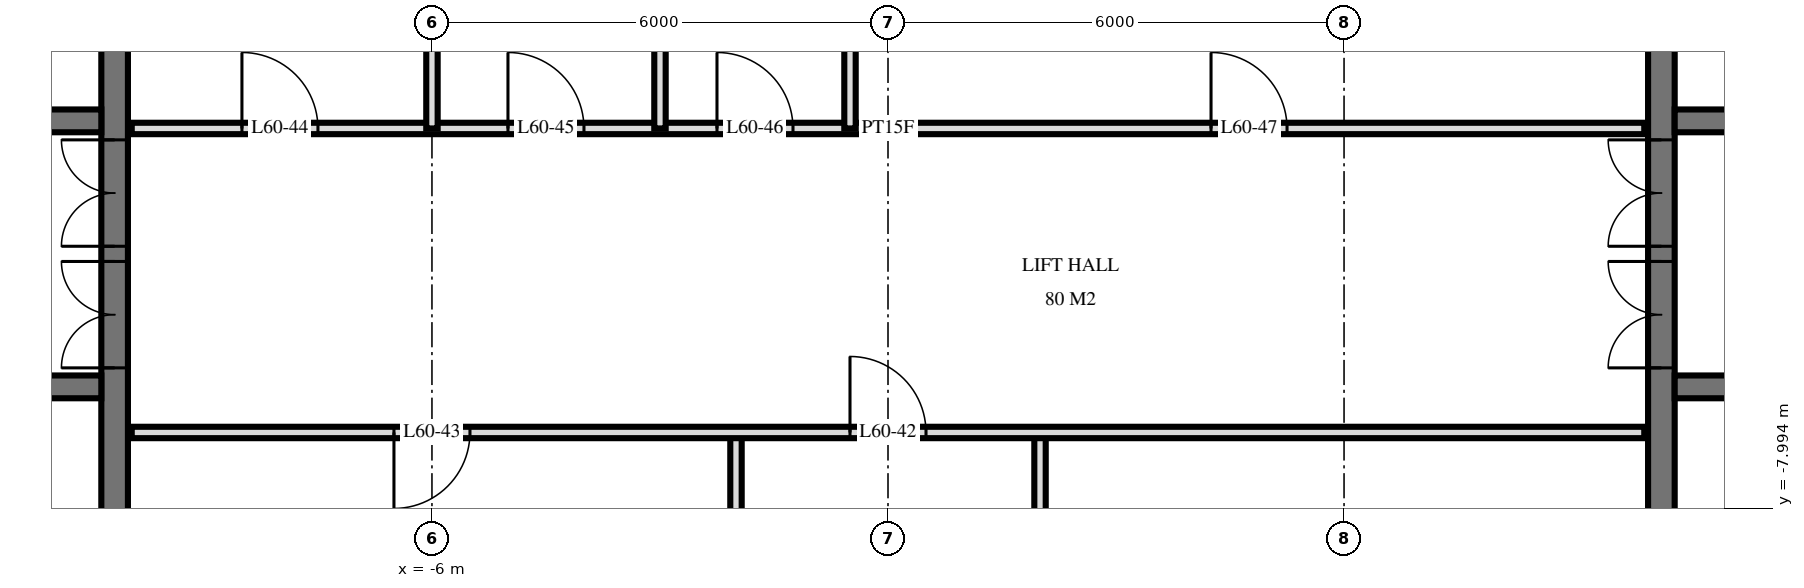
"""IFC4 building model, lengths in metres.
Left out: names, types, materials, properties, quantities, classifications, styles, units other than length and angle.
Written with IfcOpenShell. Run it as: python <this file> out.ifc"""

import sys

from ifc_helpers import new_model, si_unit, direction, frame, frame_2d, origin, place, context, subcontext, project, spatial, rectangle, extrude, element, fill, save


model = new_model("IFC4")
c1 = context("Model", 3, precision=1e-05, world=origin(), true_north=direction((0.0, 1.0)))
c2 = subcontext(c1, "Body", "Model", "MODEL_VIEW")
j1 = project(units=[si_unit("LENGTHUNIT", "METRE"), si_unit("PLANEANGLEUNIT", "RADIAN")], contexts=[c1])
p1 = place(None, origin())
s1 = spatial("IfcSite", under=j1, at=p1, CompositionType="ELEMENT")
p2 = place(p1, origin())
s2 = spatial("IfcBuilding", under=s1, at=p2, CompositionType="ELEMENT")
p3 = place(p2, frame((0.0, 0.0, 229.1)))
s3 = spatial("IfcBuildingStorey", under=s2, at=p3, CompositionType="ELEMENT", Elevation=229.1)
p4 = place(p3, frame((-10.175, -14.55, 0.0), z_axis=(0.0, 0.0, 1.0), x_axis=(0.0, 1.0, 0.0)))
e1 = element("IfcWall", 1, at=p4, inside=s3, PredefinedType="SHEAR", context=c2, shape_type="SweptSolid", body=[
    extrude(rectangle(XDim=14.1, YDim=0.35, at=frame_2d((7.05, 0.0))), origin(), (0.0, 0.0, 1.0), 3.5),
])
p5 = place(p4, frame((8.4, 0.0, 0.0)))
e2 = element("IfcOpeningElement", 2, at=p5, cuts=e1, PredefinedType="OPENING", context=c2, shape_type="SweptSolid", body=[
    extrude(rectangle(XDim=1.4, YDim=2.4, at=frame_2d((0.7, 1.2))), frame((0.0, 0.185, 0.0), z_axis=(0.0, -1.0, 0.0), x_axis=(1.0, 0.0, 0.0)), (0.0, 0.0, 1.0), 0.37),
])
p6 = place(p4, frame((10.0, 0.0, 0.0)))
e3 = element("IfcOpeningElement", 3, at=p6, cuts=e1, PredefinedType="OPENING", context=c2, shape_type="SweptSolid", body=[
    extrude(rectangle(XDim=1.4, YDim=2.4, at=frame_2d((0.7, 1.2))), frame((0.0, 0.185, 0.0), z_axis=(0.0, -1.0, 0.0), x_axis=(1.0, 0.0, 0.0)), (0.0, 0.0, 1.0), 0.37),
])
p7 = place(p4, frame((4.0, 0.0, 0.0)))
e4 = element("IfcOpeningElement", 4, at=p7, cuts=e1, PredefinedType="OPENING", context=c2, shape_type="SweptSolid", body=[
    extrude(rectangle(XDim=1.2, YDim=2.1, at=frame_2d((0.6, 1.05))), frame((0.0, 0.185, 0.0), z_axis=(0.0, -1.0, 0.0), x_axis=(1.0, 0.0, 0.0)), (0.0, 0.0, 1.0), 0.37),
])
p8 = place(p3, frame((-24.05, -2.9, 0.0), z_axis=(0.0, 0.0, 1.0), x_axis=(1.0, 0.0, 0.0)))
e5 = element("IfcWall", 5, at=p8, inside=s3, PredefinedType="SHEAR", context=c2, shape_type="SweptSolid", body=[
    extrude(rectangle(XDim=13.7, YDim=0.3, at=frame_2d((6.85, 0.0))), origin(), (0.0, 0.0, 1.0), 3.5),
])
p9 = place(p8, frame((0.55, 0.0, 0.0)))
e6 = element("IfcOpeningElement", 6, at=p9, cuts=e5, PredefinedType="OPENING", context=c2, shape_type="SweptSolid", body=[
    extrude(rectangle(XDim=1.1, YDim=2.1, at=frame_2d((0.55, 1.05))), frame((0.0, 0.16, 0.0), z_axis=(0.0, -1.0, 0.0), x_axis=(1.0, 0.0, 0.0)), (0.0, 0.0, 1.0), 0.32),
])
p10 = place(p8, frame((5.9, 0.0, 0.0)))
e7 = element("IfcOpeningElement", 7, at=p10, cuts=e5, PredefinedType="OPENING", context=c2, shape_type="SweptSolid", body=[
    extrude(rectangle(XDim=0.9, YDim=2.1, at=frame_2d((0.45, 1.05))), frame((0.0, 0.16, 0.0), z_axis=(0.0, -1.0, 0.0), x_axis=(1.0, 0.0, 0.0)), (0.0, 0.0, 1.0), 0.32),
])
p11 = place(p8, frame((11.85, 0.0, 0.0)))
e8 = element("IfcOpeningElement", 8, at=p11, cuts=e5, PredefinedType="OPENING", context=c2, shape_type="SweptSolid", body=[
    extrude(rectangle(XDim=1.0, YDim=2.1, at=frame_2d((0.5, 1.05))), frame((0.0, 0.16, 0.0), z_axis=(0.0, -1.0, 0.0), x_axis=(1.0, 0.0, 0.0)), (0.0, 0.0, 1.0), 0.32),
])
p12 = place(p8, frame((8.85, 0.0, 0.0)))
e9 = element("IfcOpeningElement", 9, at=p12, cuts=e5, PredefinedType="OPENING", context=c2, shape_type="SweptSolid", body=[
    extrude(rectangle(XDim=1.0, YDim=2.1, at=frame_2d((0.5, 1.05))), frame((0.0, 0.16, 0.0), z_axis=(0.0, -1.0, 0.0), x_axis=(1.0, 0.0, 0.0)), (0.0, 0.0, 1.0), 0.32),
])
p13 = place(p8, frame((3.0, 0.0, 0.0)))
e10 = element("IfcOpeningElement", 10, at=p13, cuts=e5, PredefinedType="OPENING", context=c2, shape_type="SweptSolid", body=[
    extrude(rectangle(XDim=1.0, YDim=2.1, at=frame_2d((0.5, 1.05))), frame((0.0, 0.16, 0.0), z_axis=(0.0, -1.0, 0.0), x_axis=(1.0, 0.0, 0.0)), (0.0, 0.0, 1.0), 0.32),
])
p14 = place(p3, frame((-24.05, -6.4, 0.0), z_axis=(0.0, 0.0, 1.0), x_axis=(1.0, 0.0, 0.0)))
e11 = element("IfcWall", 11, at=p14, inside=s3, PredefinedType="SHEAR", context=c2, shape_type="SweptSolid", body=[
    extrude(rectangle(XDim=13.7, YDim=0.3, at=frame_2d((6.85, 0.0))), origin(), (0.0, 0.0, 1.0), 3.5),
])
p15 = place(p14, frame((0.55, 0.0, 0.0)))
e12 = element("IfcOpeningElement", 12, at=p15, cuts=e11, PredefinedType="OPENING", context=c2, shape_type="SweptSolid", body=[
    extrude(rectangle(XDim=1.1, YDim=2.1, at=frame_2d((0.55, 1.05))), frame((0.0, 0.16, 0.0), z_axis=(0.0, -1.0, 0.0), x_axis=(1.0, 0.0, 0.0)), (0.0, 0.0, 1.0), 0.32),
])
p16 = place(p14, frame((5.8, 0.0, 0.0)))
e13 = element("IfcOpeningElement", 13, at=p16, cuts=e11, PredefinedType="OPENING", context=c2, shape_type="SweptSolid", body=[
    extrude(rectangle(XDim=1.1, YDim=2.1, at=frame_2d((0.55, 1.05))), frame((0.0, 0.16, 0.0), z_axis=(0.0, -1.0, 0.0), x_axis=(1.0, 0.0, 0.0)), (0.0, 0.0, 1.0), 0.32),
])
p17 = place(p3, frame((10.175, -14.55, 0.0), z_axis=(0.0, 0.0, 1.0), x_axis=(0.0, 1.0, 0.0)))
e14 = element("IfcWall", 14, at=p17, inside=s3, PredefinedType="SHEAR", context=c2, shape_type="SweptSolid", body=[
    extrude(rectangle(XDim=14.1, YDim=0.35, at=frame_2d((7.05, 0.0))), origin(), (0.0, 0.0, 1.0), 3.5),
])
p18 = place(p17, frame((8.4, 0.0, 0.0)))
e15 = element("IfcOpeningElement", 15, at=p18, cuts=e14, PredefinedType="OPENING", context=c2, shape_type="SweptSolid", body=[
    extrude(rectangle(XDim=1.4, YDim=2.4, at=frame_2d((0.7, 1.2))), frame((0.0, 0.185, 0.0), z_axis=(0.0, -1.0, 0.0), x_axis=(1.0, 0.0, 0.0)), (0.0, 0.0, 1.0), 0.37),
])
p19 = place(p17, frame((10.0, 0.0, 0.0)))
e16 = element("IfcOpeningElement", 16, at=p19, cuts=e14, PredefinedType="OPENING", context=c2, shape_type="SweptSolid", body=[
    extrude(rectangle(XDim=1.4, YDim=2.4, at=frame_2d((0.7, 1.2))), frame((0.0, 0.185, 0.0), z_axis=(0.0, -1.0, 0.0), x_axis=(1.0, 0.0, 0.0)), (0.0, 0.0, 1.0), 0.37),
])
p20 = place(p17, frame((4.0, 0.0, 0.0)))
e17 = element("IfcOpeningElement", 17, at=p20, cuts=e14, PredefinedType="OPENING", context=c2, shape_type="SweptSolid", body=[
    extrude(rectangle(XDim=1.2, YDim=2.1, at=frame_2d((0.6, 1.05))), frame((0.0, 0.185, 0.0), z_axis=(0.0, -1.0, 0.0), x_axis=(1.0, 0.0, 0.0)), (0.0, 0.0, 1.0), 0.37),
])
p21 = place(p3, frame((10.35, -2.9, 0.0), z_axis=(0.0, 0.0, 1.0), x_axis=(1.0, 0.0, 0.0)))
e18 = element("IfcWall", 18, at=p21, inside=s3, PredefinedType="SHEAR", context=c2, shape_type="SweptSolid", body=[
    extrude(rectangle(XDim=13.7, YDim=0.3, at=frame_2d((6.85, 0.0))), origin(), (0.0, 0.0, 1.0), 3.5),
])
p22 = place(p21, frame((12.05, 0.0, 0.0)))
e19 = element("IfcOpeningElement", 19, at=p22, cuts=e18, PredefinedType="OPENING", context=c2, shape_type="SweptSolid", body=[
    extrude(rectangle(XDim=1.1, YDim=2.1, at=frame_2d((0.55, 1.05))), frame((0.0, 0.16, 0.0), z_axis=(0.0, -1.0, 0.0), x_axis=(1.0, 0.0, 0.0)), (0.0, 0.0, 1.0), 0.32),
])
p23 = place(p21, frame((6.9, 0.0, 0.0)))
e20 = element("IfcOpeningElement", 20, at=p23, cuts=e18, PredefinedType="OPENING", context=c2, shape_type="SweptSolid", body=[
    extrude(rectangle(XDim=0.9, YDim=2.1, at=frame_2d((0.45, 1.05))), frame((0.0, 0.16, 0.0), z_axis=(0.0, -1.0, 0.0), x_axis=(1.0, 0.0, 0.0)), (0.0, 0.0, 1.0), 0.32),
])
p24 = place(p21, frame((0.85, 0.0, 0.0)))
e21 = element("IfcOpeningElement", 21, at=p24, cuts=e18, PredefinedType="OPENING", context=c2, shape_type="SweptSolid", body=[
    extrude(rectangle(XDim=1.0, YDim=2.1, at=frame_2d((0.5, 1.05))), frame((0.0, 0.16, 0.0), z_axis=(0.0, -1.0, 0.0), x_axis=(1.0, 0.0, 0.0)), (0.0, 0.0, 1.0), 0.32),
])
p25 = place(p21, frame((3.85, 0.0, 0.0)))
e22 = element("IfcOpeningElement", 22, at=p25, cuts=e18, PredefinedType="OPENING", context=c2, shape_type="SweptSolid", body=[
    extrude(rectangle(XDim=1.0, YDim=2.1, at=frame_2d((0.5, 1.05))), frame((0.0, 0.16, 0.0), z_axis=(0.0, -1.0, 0.0), x_axis=(1.0, 0.0, 0.0)), (0.0, 0.0, 1.0), 0.32),
])
p26 = place(p21, frame((9.7, 0.0, 0.0)))
e23 = element("IfcOpeningElement", 23, at=p26, cuts=e18, PredefinedType="OPENING", context=c2, shape_type="SweptSolid", body=[
    extrude(rectangle(XDim=1.0, YDim=2.1, at=frame_2d((0.5, 1.05))), frame((0.0, 0.16, 0.0), z_axis=(0.0, -1.0, 0.0), x_axis=(1.0, 0.0, 0.0)), (0.0, 0.0, 1.0), 0.32),
])
p27 = place(p3, frame((10.35, -6.4, 0.0), z_axis=(0.0, 0.0, 1.0), x_axis=(1.0, 0.0, 0.0)))
e24 = element("IfcWall", 24, at=p27, inside=s3, PredefinedType="SHEAR", context=c2, shape_type="SweptSolid", body=[
    extrude(rectangle(XDim=13.7, YDim=0.3, at=frame_2d((6.85, 0.0))), origin(), (0.0, 0.0, 1.0), 3.5),
])
p28 = place(p27, frame((12.05, 0.0, 0.0)))
e25 = element("IfcOpeningElement", 25, at=p28, cuts=e24, PredefinedType="OPENING", context=c2, shape_type="SweptSolid", body=[
    extrude(rectangle(XDim=1.1, YDim=2.1, at=frame_2d((0.55, 1.05))), frame((0.0, 0.16, 0.0), z_axis=(0.0, -1.0, 0.0), x_axis=(1.0, 0.0, 0.0)), (0.0, 0.0, 1.0), 0.32),
])
p29 = place(p27, frame((6.8, 0.0, 0.0)))
e26 = element("IfcOpeningElement", 26, at=p29, cuts=e24, PredefinedType="OPENING", context=c2, shape_type="SweptSolid", body=[
    extrude(rectangle(XDim=1.1, YDim=2.1, at=frame_2d((0.55, 1.05))), frame((0.0, 0.16, 0.0), z_axis=(0.0, -1.0, 0.0), x_axis=(1.0, 0.0, 0.0)), (0.0, 0.0, 1.0), 0.32),
])
p30 = place(p3, frame((2.0, -11.0, 0.0), z_axis=(0.0, 0.0, 1.0), x_axis=(0.0, 1.0, 0.0)))
e27 = element("IfcWall", 27, at=p30, inside=s3, PredefinedType="PARTITIONING", context=c2, shape_type="SweptSolid", body=[
    extrude(rectangle(XDim=4.0, YDim=0.15, at=frame_2d((2.0, 0.0))), origin(), (0.0, 0.0, 1.0), 3.22),
])
p31 = place(p3, frame((-0.5, -3.0, 0.0), z_axis=(0.0, 0.0, 1.0), x_axis=(0.0, 1.0, 0.0)))
e28 = element("IfcWall", 28, at=p31, inside=s3, PredefinedType="PLUMBINGWALL", context=c2, shape_type="SweptSolid", body=[
    extrude(rectangle(XDim=4.02, YDim=0.15, at=frame_2d((2.01, 0.0))), origin(), (0.0, 0.0, 1.0), 3.22),
])
p32 = place(p3, frame((-2.0, -11.0, 0.0), z_axis=(0.0, 0.0, 1.0), x_axis=(0.0, 1.0, 0.0)))
e29 = element("IfcWall", 29, at=p32, inside=s3, PredefinedType="PARTITIONING", context=c2, shape_type="SweptSolid", body=[
    extrude(rectangle(XDim=4.0, YDim=0.15, at=frame_2d((2.0, 0.0))), origin(), (0.0, 0.0, 1.0), 3.22),
])
for number, where, z_axis, x_axis in (
    (30, (-3.0, -3.0, 0.0), (0.0, 0.0, 1.0), (0.0, 1.0, 0.0)),
    (31, (-6.0, -3.0, 0.0), (0.0, 0.0, 1.0), (0.0, 1.0, 0.0)),
):
    element("IfcWall", number, at=place(p3, frame(where, z_axis=z_axis, x_axis=x_axis)), inside=s3, PredefinedType="PLUMBINGWALL", context=c2, shape_type="SweptSolid", body=[
        extrude(rectangle(XDim=4.02, YDim=0.15, at=frame_2d((2.01, 0.0))), origin(), (0.0, 0.0, 1.0), 3.22),
    ])
p33 = place(p3, frame((-9.95, -7.0, 0.0), z_axis=(0.0, 0.0, 1.0), x_axis=(1.0, 0.0, 0.0)))
e32 = element("IfcWall", 32, at=p33, inside=s3, PredefinedType="PARTITIONING", context=c2, shape_type="SweptSolid", body=[
    extrude(rectangle(XDim=19.9, YDim=0.15, at=frame_2d((9.95, 0.0))), origin(), (0.0, 0.0, 1.0), 3.22),
])
p34 = place(p33, frame((9.45, 0.0, 0.0)))
e33 = element("IfcOpeningElement", 33, at=p34, cuts=e32, PredefinedType="OPENING", context=c2, shape_type="SweptSolid", body=[
    extrude(rectangle(XDim=1.0, YDim=2.1, at=frame_2d((0.5, 1.05))), frame((0.0, 0.085, 0.0), z_axis=(0.0, -1.0, 0.0), x_axis=(1.0, 0.0, 0.0)), (0.0, 0.0, 1.0), 0.17),
])
p35 = place(p33, frame((3.45, 0.0, 0.0)))
e34 = element("IfcOpeningElement", 34, at=p35, cuts=e32, PredefinedType="OPENING", context=c2, shape_type="SweptSolid", body=[
    extrude(rectangle(XDim=1.0, YDim=2.1, at=frame_2d((0.5, 1.05))), frame((0.0, 0.085, 0.0), z_axis=(0.0, -1.0, 0.0), x_axis=(1.0, 0.0, 0.0)), (0.0, 0.0, 1.0), 0.17),
])
p36 = place(p3, frame((-9.95, -3.0, 0.0), z_axis=(0.0, 0.0, 1.0), x_axis=(1.0, 0.0, 0.0)))
e35 = element("IfcWall", 35, at=p36, inside=s3, PredefinedType="PARTITIONING", context=c2, shape_type="SweptSolid", body=[
    extrude(rectangle(XDim=19.9, YDim=0.15, at=frame_2d((9.95, 0.0))), origin(), (0.0, 0.0, 1.0), 3.22),
])
p37 = place(p36, frame((1.45, 0.0, 0.0)))
e36 = element("IfcOpeningElement", 36, at=p37, cuts=e35, PredefinedType="OPENING", context=c2, shape_type="SweptSolid", body=[
    extrude(rectangle(XDim=1.0, YDim=2.1, at=frame_2d((0.5, 1.05))), frame((0.0, 0.085, 0.0), z_axis=(0.0, -1.0, 0.0), x_axis=(1.0, 0.0, 0.0)), (0.0, 0.0, 1.0), 0.17),
])
p38 = place(p36, frame((4.95, 0.0, 0.0)))
e37 = element("IfcOpeningElement", 37, at=p38, cuts=e35, PredefinedType="OPENING", context=c2, shape_type="SweptSolid", body=[
    extrude(rectangle(XDim=1.0, YDim=2.1, at=frame_2d((0.5, 1.05))), frame((0.0, 0.085, 0.0), z_axis=(0.0, -1.0, 0.0), x_axis=(1.0, 0.0, 0.0)), (0.0, 0.0, 1.0), 0.17),
])
p39 = place(p36, frame((7.7, 0.0, 0.0)))
e38 = element("IfcOpeningElement", 38, at=p39, cuts=e35, PredefinedType="OPENING", context=c2, shape_type="SweptSolid", body=[
    extrude(rectangle(XDim=1.0, YDim=2.1, at=frame_2d((0.5, 1.05))), frame((0.0, 0.085, 0.0), z_axis=(0.0, -1.0, 0.0), x_axis=(1.0, 0.0, 0.0)), (0.0, 0.0, 1.0), 0.17),
])
p40 = place(p36, frame((14.2, 0.0, 0.0)))
e39 = element("IfcOpeningElement", 39, at=p40, cuts=e35, PredefinedType="OPENING", context=c2, shape_type="SweptSolid", body=[
    extrude(rectangle(XDim=1.0, YDim=2.1, at=frame_2d((0.5, 1.05))), frame((0.0, 0.085, 0.0), z_axis=(0.0, -1.0, 0.0), x_axis=(1.0, 0.0, 0.0)), (0.0, 0.0, 1.0), 0.17),
])
p41 = place(p5, origin())
e40 = element("IfcDoor", 40, at=p41, inside=s3, OperationType="DOUBLE_DOOR_SINGLE_SWING", PredefinedType="DOOR", context=c2, shape_type="SweptSolid", body=[
    extrude(rectangle(XDim=1.4, YDim=2.4, at=frame_2d((0.7, 1.2))), frame((0.0, 0.025, 0.0), z_axis=(0.0, -1.0, 0.0), x_axis=(1.0, 0.0, 0.0)), (0.0, 0.0, 1.0), 0.05),
])
fill(e2, e40)
p42 = place(p6, origin())
e41 = element("IfcDoor", 41, at=p42, inside=s3, OperationType="DOUBLE_DOOR_SINGLE_SWING", PredefinedType="DOOR", context=c2, shape_type="SweptSolid", body=[
    extrude(rectangle(XDim=1.4, YDim=2.4, at=frame_2d((0.7, 1.2))), frame((0.0, 0.025, 0.0), z_axis=(0.0, -1.0, 0.0), x_axis=(1.0, 0.0, 0.0)), (0.0, 0.0, 1.0), 0.05),
])
fill(e3, e41)
p43 = place(p18, origin())
e42 = element("IfcDoor", 42, at=p43, inside=s3, OperationType="DOUBLE_DOOR_SINGLE_SWING", PredefinedType="DOOR", context=c2, shape_type="SweptSolid", body=[
    extrude(rectangle(XDim=1.4, YDim=2.4, at=frame_2d((0.7, 1.2))), frame((0.0, 0.025, 0.0), z_axis=(0.0, -1.0, 0.0), x_axis=(1.0, 0.0, 0.0)), (0.0, 0.0, 1.0), 0.05),
])
fill(e15, e42)
p44 = place(p19, origin())
e43 = element("IfcDoor", 43, at=p44, inside=s3, OperationType="DOUBLE_DOOR_SINGLE_SWING", PredefinedType="DOOR", context=c2, shape_type="SweptSolid", body=[
    extrude(rectangle(XDim=1.4, YDim=2.4, at=frame_2d((0.7, 1.2))), frame((0.0, 0.025, 0.0), z_axis=(0.0, -1.0, 0.0), x_axis=(1.0, 0.0, 0.0)), (0.0, 0.0, 1.0), 0.05),
])
fill(e16, e43)
p45 = place(p34, origin())
e44 = element("IfcDoor", 44, at=p45, inside=s3, OperationType="SINGLE_SWING_RIGHT", PredefinedType="DOOR", context=c2, shape_type="SweptSolid", body=[
    extrude(rectangle(XDim=1.0, YDim=2.1, at=frame_2d((0.5, 1.05))), frame((0.0, 0.025, 0.0), z_axis=(0.0, -1.0, 0.0), x_axis=(1.0, 0.0, 0.0)), (0.0, 0.0, 1.0), 0.05),
])
fill(e33, e44)
p46 = place(p35, frame((0.5, 0.0, 0.0), z_axis=(0.0, 0.0, 1.0), x_axis=(-1.0, 0.0, 0.0)))
e45 = element("IfcDoor", 45, at=p46, inside=s3, OperationType="SINGLE_SWING_LEFT", PredefinedType="DOOR", context=c2, shape_type="SweptSolid", body=[
    extrude(rectangle(XDim=1.0, YDim=2.1, at=frame_2d((0.0, 1.05))), frame((0.0, -0.025, 0.0), z_axis=(0.0, 1.0, 0.0), x_axis=(-1.0, 0.0, 0.0)), (0.0, 0.0, 1.0), 0.05),
])
fill(e34, e45)
p47 = place(p37, origin())
e46 = element("IfcDoor", 46, at=p47, inside=s3, OperationType="SINGLE_SWING_RIGHT", PredefinedType="DOOR", context=c2, shape_type="SweptSolid", body=[
    extrude(rectangle(XDim=1.0, YDim=2.1, at=frame_2d((0.5, 1.05))), frame((0.0, 0.025, 0.0), z_axis=(0.0, -1.0, 0.0), x_axis=(1.0, 0.0, 0.0)), (0.0, 0.0, 1.0), 0.05),
])
fill(e36, e46)
p48 = place(p38, origin())
e47 = element("IfcDoor", 47, at=p48, inside=s3, OperationType="SINGLE_SWING_RIGHT", PredefinedType="DOOR", context=c2, shape_type="SweptSolid", body=[
    extrude(rectangle(XDim=1.0, YDim=2.1, at=frame_2d((0.5, 1.05))), frame((0.0, 0.025, 0.0), z_axis=(0.0, -1.0, 0.0), x_axis=(1.0, 0.0, 0.0)), (0.0, 0.0, 1.0), 0.05),
])
fill(e37, e47)
p49 = place(p39, origin())
e48 = element("IfcDoor", 48, at=p49, inside=s3, OperationType="SINGLE_SWING_RIGHT", PredefinedType="DOOR", context=c2, shape_type="SweptSolid", body=[
    extrude(rectangle(XDim=1.0, YDim=2.1, at=frame_2d((0.5, 1.05))), frame((0.0, 0.025, 0.0), z_axis=(0.0, -1.0, 0.0), x_axis=(1.0, 0.0, 0.0)), (0.0, 0.0, 1.0), 0.05),
])
fill(e38, e48)
p50 = place(p40, origin())
e49 = element("IfcDoor", 49, at=p50, inside=s3, OperationType="SINGLE_SWING_RIGHT", PredefinedType="DOOR", context=c2, shape_type="SweptSolid", body=[
    extrude(rectangle(XDim=1.0, YDim=2.1, at=frame_2d((0.5, 1.05))), frame((0.0, 0.025, 0.0), z_axis=(0.0, -1.0, 0.0), x_axis=(1.0, 0.0, 0.0)), (0.0, 0.0, 1.0), 0.05),
])
fill(e39, e49)
save(model, sys.argv[1])
